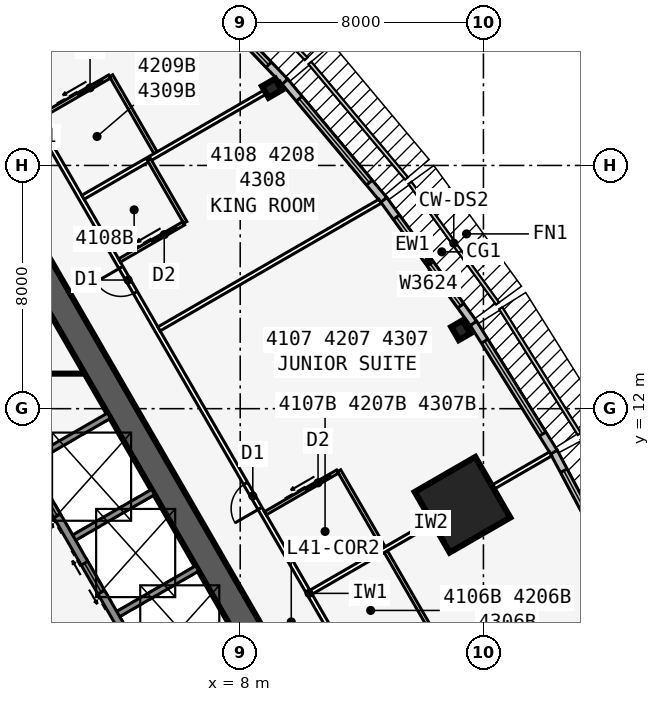
"""IFC4 building model, lengths in metres.
Left out: names, types, materials, properties, quantities, classifications, styles, units other than length and angle.
Written with IfcOpenShell. Run it as: python <this file> out.ifc"""

import sys

from ifc_helpers import new_model, si_unit, direction, frame, frame_2d, origin, origin_2d, place, context, subcontext, project, spatial, rectangle, i_section, extrude, element, fill, save


model = new_model("IFC4")
c1 = context("Model", 3, precision=1e-05, world=origin(), true_north=direction((0.0, 1.0)))
c2 = subcontext(c1, "Body", "Model", "MODEL_VIEW")
j1 = project(units=[si_unit("LENGTHUNIT", "METRE"), si_unit("PLANEANGLEUNIT", "RADIAN")], contexts=[c1])
p1 = place(None, origin())
s1 = spatial("IfcSite", under=j1, at=p1, CompositionType="ELEMENT")
p2 = place(p1, origin())
s2 = spatial("IfcBuilding", under=s1, at=p2, CompositionType="ELEMENT")
p3 = place(p2, frame((0.0, 0.0, 155.5)))
s3 = spatial("IfcBuildingStorey", under=s2, at=p3, CompositionType="ELEMENT", Elevation=155.5)
p4 = place(p3, frame((16.5, -9.526, 0.0), z_axis=(0.0, 0.0, 1.0), x_axis=(-0.499999749417, 0.866025548458, 0.0)))
e1 = element("IfcWall", 1, at=p4, inside=s3, PredefinedType="SHEAR", context=c2, shape_type="SweptSolid", body=[
    extrude(rectangle(XDim=33.0, YDim=0.9, at=frame_2d((16.5, 0.0))), origin(), (0.0, 0.0, 1.0), 3.4),
])
p5 = place(p4, frame((14.15, 0.0, 0.0)))
e2 = element("IfcOpeningElement", 2, at=p5, cuts=e1, PredefinedType="OPENING", context=c2, shape_type="SweptSolid", body=[
    extrude(rectangle(XDim=1.8, YDim=2.13, at=frame_2d((0.9, 1.065))), frame((0.0, 0.46, 0.0), z_axis=(0.0, -1.0, 0.0), x_axis=(1.0, 0.0, 0.0)), (0.0, 0.0, 1.0), 0.92),
])
p6 = place(p4, frame((12.6, 0.0, 0.0)))
e3 = element("IfcOpeningElement", 3, at=p6, cuts=e1, PredefinedType="OPENING", context=c2, shape_type="SweptSolid", body=[
    extrude(rectangle(XDim=1.0, YDim=2.13, at=frame_2d((0.5, 1.065))), frame((0.0, 0.46, 0.0), z_axis=(0.0, -1.0, 0.0), x_axis=(1.0, 0.0, 0.0)), (0.0, 0.0, 1.0), 0.92),
])
p7 = place(p3, frame((5.379, 2.586, 0.0), z_axis=(0.0, 0.0, 1.0), x_axis=(-0.500001375892, 0.866024609411, 0.0)))
e4 = element("IfcWall", 4, at=p7, inside=s3, PredefinedType="SOLIDWALL", context=c2, shape_type="SweptSolid", body=[
    extrude(rectangle(XDim=10.633, YDim=0.25, at=frame_2d((5.316, 0.0))), origin(), (0.0, 0.0, 1.0), 3.235),
])
p8 = place(p7, frame((9.164, 0.0, 0.0)))
e5 = element("IfcOpeningElement", 5, at=p8, cuts=e4, PredefinedType="OPENING", context=c2, shape_type="SweptSolid", body=[
    extrude(rectangle(XDim=0.9, YDim=2.13, at=frame_2d((0.45, 1.065))), frame((0.0, 0.135, 0.0), z_axis=(0.0, -1.0, 0.0), x_axis=(1.0, 0.0, 0.0)), (0.0, 0.0, 1.0), 0.27),
])
p9 = place(p7, frame((1.0, 0.0, 0.0)))
e6 = element("IfcOpeningElement", 6, at=p9, cuts=e4, PredefinedType="OPENING", context=c2, shape_type="SweptSolid", body=[
    extrude(rectangle(XDim=1.1, YDim=2.13, at=frame_2d((0.55, 1.065))), frame((0.0, 0.135, 0.0), z_axis=(0.0, -1.0, 0.0), x_axis=(1.0, 0.0, 0.0)), (0.0, 0.0, 1.0), 0.27),
])
p10 = place(p7, frame((3.9, 0.0, 0.0)))
e7 = element("IfcOpeningElement", 7, at=p10, cuts=e4, PredefinedType="OPENING", context=c2, shape_type="SweptSolid", body=[
    extrude(rectangle(XDim=1.1, YDim=2.13, at=frame_2d((0.55, 1.065))), frame((0.0, 0.135, 0.0), z_axis=(0.0, -1.0, 0.0), x_axis=(1.0, 0.0, 0.0)), (0.0, 0.0, 1.0), 0.27),
])
p11 = place(p7, frame((6.8, 0.0, 0.0)))
e8 = element("IfcOpeningElement", 8, at=p11, cuts=e4, PredefinedType="OPENING", context=c2, shape_type="SweptSolid", body=[
    extrude(rectangle(XDim=1.1, YDim=2.13, at=frame_2d((0.55, 1.065))), frame((0.0, 0.135, 0.0), z_axis=(0.0, -1.0, 0.0), x_axis=(1.0, 0.0, 0.0)), (0.0, 0.0, 1.0), 0.27),
])
for number, where, z_axis, x_axis in (
    (9, (3.879, 5.184, 0.0), (0.0, 0.0, 1.0), (0.866, 0.5, 0.0)),
    (10, (2.429, 7.696, 0.0), (0.0, 0.0, 1.0), (0.866, 0.5, 0.0)),
    (11, (0.979, 10.207, 0.0), (0.0, 0.0, 1.0), (0.866, 0.5, 0.0)),
):
    element("IfcWall", number, at=place(p3, frame(where, z_axis=z_axis, x_axis=x_axis)), inside=s3, PredefinedType="SOLIDWALL", context=c2, shape_type="SweptSolid", body=[
        extrude(rectangle(XDim=3.125, YDim=0.2, at=frame_2d((1.562, 0.0))), origin(), (0.0, 0.0, 1.0), 3.235),
    ])
for number, where, z_axis, x_axis in (
    (12, (15.254, 14.58, 0.0), (0.0, 0.0, 1.0), (0.866, 0.5, 0.0)),
    (13, (9.041, 22.541, 0.0), (0.0, 0.0, 1.0), (-0.5, 0.866, 0.0)),
):
    element("IfcColumn", number, at=place(p3, frame(where, z_axis=z_axis, x_axis=x_axis)), inside=s3, PredefinedType="COLUMN", context=c2, shape_type="SweptSolid", body=[
        extrude(i_section(OverallWidth=0.432, OverallDepth=0.498, WebThickness=0.056, FlangeThickness=0.089, at=origin_2d()), origin(), (0.0, 0.0, 1.0), 3.4),
    ])
p12 = place(p3, frame((15.312, 8.84, 0.0), z_axis=(0.0, 0.0, 1.0), x_axis=(0.866025403784, 0.5, 0.0)))
e14 = element("IfcColumn", 14, at=p12, inside=s3, PredefinedType="COLUMN", context=c2, shape_type="SweptSolid", body=[
    extrude(rectangle(XDim=2.3, YDim=2.3, at=origin_2d()), origin(), (0.0, 0.0, 1.0), 3.4),
])
p13 = place(p3, frame((20.663, 6.161, 0.0), z_axis=(0.0, 0.0, 1.0), x_axis=(-0.469404966864, 0.882982999317, 0.0)))
e15 = element("IfcWall", 15, at=p13, inside=s3, PredefinedType="STANDARD", context=c2, shape_type="SweptSolid", body=[
    extrude(rectangle(XDim=5.003, YDim=0.25, at=frame_2d((2.501, 0.0))), origin(), (0.0, 0.0, 1.0), 3.235),
])
p14 = place(p13, frame((0.701, 0.0, 0.45)))
e16 = element("IfcOpeningElement", 16, at=p14, cuts=e15, PredefinedType="OPENING", context=c2, shape_type="SweptSolid", body=[
    extrude(rectangle(XDim=3.6, YDim=2.4, at=frame_2d((1.8, 1.2))), frame((0.0, 0.135, 0.0), z_axis=(0.0, -1.0, 0.0), x_axis=(1.0, 0.0, 0.0)), (0.0, 0.0, 1.0), 0.27),
])
p15 = place(p3, frame((18.319, 10.571, 0.0), z_axis=(0.0, 0.0, 1.0), x_axis=(-0.529990167382, 0.84800378683, 0.0)))
e17 = element("IfcWall", 17, at=p15, inside=s3, PredefinedType="STANDARD", context=c2, shape_type="SweptSolid", body=[
    extrude(rectangle(XDim=5.003, YDim=0.25, at=frame_2d((2.501, 0.0))), origin(), (0.0, 0.0, 1.0), 3.235),
])
p16 = place(p15, frame((0.701, 0.0, 0.45)))
e18 = element("IfcOpeningElement", 18, at=p16, cuts=e17, PredefinedType="OPENING", context=c2, shape_type="SweptSolid", body=[
    extrude(rectangle(XDim=3.6, YDim=2.4, at=frame_2d((1.8, 1.2))), frame((0.0, 0.135, 0.0), z_axis=(0.0, -1.0, 0.0), x_axis=(1.0, 0.0, 0.0)), (0.0, 0.0, 1.0), 0.27),
])
p17 = place(p3, frame((15.672, 14.807, 0.0), z_axis=(0.0, 0.0, 1.0), x_axis=(-0.587669188412, 0.809101307001, 0.0)))
e19 = element("IfcWall", 19, at=p17, inside=s3, PredefinedType="STANDARD", context=c2, shape_type="SweptSolid", body=[
    extrude(rectangle(XDim=5.028, YDim=0.25, at=frame_2d((2.514, 0.0))), origin(), (0.0, 0.0, 1.0), 3.235),
])
p18 = place(p17, frame((0.714, 0.0, 0.45)))
e20 = element("IfcOpeningElement", 20, at=p18, cuts=e19, PredefinedType="OPENING", context=c2, shape_type="SweptSolid", body=[
    extrude(rectangle(XDim=3.6, YDim=2.4, at=frame_2d((1.8, 1.2))), frame((0.0, 0.135, 0.0), z_axis=(0.0, -1.0, 0.0), x_axis=(1.0, 0.0, 0.0)), (0.0, 0.0, 1.0), 0.27),
])
p19 = place(p3, frame((12.723, 18.868, 0.0), z_axis=(0.0, 0.0, 1.0), x_axis=(-0.641810386606, 0.766863369607, 0.0)))
e21 = element("IfcWall", 21, at=p19, inside=s3, PredefinedType="STANDARD", context=c2, shape_type="SweptSolid", body=[
    extrude(rectangle(XDim=5.076, YDim=0.25, at=frame_2d((2.538, 0.0))), origin(), (0.0, 0.0, 1.0), 3.235),
])
p20 = place(p19, frame((0.738, 0.0, 0.45)))
e22 = element("IfcOpeningElement", 22, at=p20, cuts=e21, PredefinedType="OPENING", context=c2, shape_type="SweptSolid", body=[
    extrude(rectangle(XDim=3.6, YDim=2.4, at=frame_2d((1.8, 1.2))), frame((0.0, 0.135, 0.0), z_axis=(0.0, -1.0, 0.0), x_axis=(1.0, 0.0, 0.0)), (0.0, 0.0, 1.0), 0.27),
])
p21 = place(p3, frame((9.471, 22.754, 0.0), z_axis=(0.0, 0.0, 1.0), x_axis=(-0.691719937936, 0.722165858693, 0.0)))
e23 = element("IfcWall", 23, at=p21, inside=s3, PredefinedType="STANDARD", context=c2, shape_type="SweptSolid", body=[
    extrude(rectangle(XDim=5.148, YDim=0.25, at=frame_2d((2.574, 0.0))), origin(), (0.0, 0.0, 1.0), 3.235),
])
p22 = place(p21, frame((0.774, 0.0, 0.45)))
e24 = element("IfcOpeningElement", 24, at=p22, cuts=e23, PredefinedType="OPENING", context=c2, shape_type="SweptSolid", body=[
    extrude(rectangle(XDim=3.6, YDim=2.4, at=frame_2d((1.8, 1.2))), frame((0.0, 0.135, 0.0), z_axis=(0.0, -1.0, 0.0), x_axis=(1.0, 0.0, 0.0)), (0.0, 0.0, 1.0), 0.27),
])
p23 = place(p3, frame((20.027, -10.985, 0.0), z_axis=(0.0, 0.0, 1.0), x_axis=(-0.500001677587, 0.866024435227, 0.0)))
e25 = element("IfcWall", 25, at=p23, inside=s3, PredefinedType="PARTITIONING", context=c2, shape_type="SweptSolid", body=[
    extrude(rectangle(XDim=39.054, YDim=0.15, at=frame_2d((19.527, 0.0))), origin(), (0.0, 0.0, 1.0), 3.235),
])
p24 = place(p23, frame((1.558, 0.0, 0.0)))
e26 = element("IfcOpeningElement", 26, at=p24, cuts=e25, PredefinedType="OPENING", context=c2, shape_type="SweptSolid", body=[
    extrude(rectangle(XDim=0.95, YDim=2.13, at=frame_2d((0.475, 1.065))), frame((0.0, 0.085, 0.0), z_axis=(0.0, -1.0, 0.0), x_axis=(1.0, 0.0, 0.0)), (0.0, 0.0, 1.0), 0.17),
])
p25 = place(p23, frame((15.352, 0.0, 0.0)))
e27 = element("IfcOpeningElement", 27, at=p25, cuts=e25, PredefinedType="OPENING", context=c2, shape_type="SweptSolid", body=[
    extrude(rectangle(XDim=0.95, YDim=2.13, at=frame_2d((0.475, 1.065))), frame((0.0, 0.085, 0.0), z_axis=(0.0, -1.0, 0.0), x_axis=(1.0, 0.0, 0.0)), (0.0, 0.0, 1.0), 0.17),
])
p26 = place(p23, frame((22.752, 0.0, 0.0)))
e28 = element("IfcOpeningElement", 28, at=p26, cuts=e25, PredefinedType="OPENING", context=c2, shape_type="SweptSolid", body=[
    extrude(rectangle(XDim=0.95, YDim=2.13, at=frame_2d((0.475, 1.065))), frame((0.0, 0.085, 0.0), z_axis=(0.0, -1.0, 0.0), x_axis=(1.0, 0.0, 0.0)), (0.0, 0.0, 1.0), 0.17),
])
p27 = place(p23, frame((30.952, 0.0, 0.0)))
e29 = element("IfcOpeningElement", 29, at=p27, cuts=e25, PredefinedType="OPENING", context=c2, shape_type="SweptSolid", body=[
    extrude(rectangle(XDim=0.95, YDim=2.13, at=frame_2d((0.475, 1.065))), frame((0.0, 0.085, 0.0), z_axis=(0.0, -1.0, 0.0), x_axis=(1.0, 0.0, 0.0)), (0.0, 0.0, 1.0), 0.17),
])
p28 = place(p23, frame((37.752, 0.0, 0.0)))
e30 = element("IfcOpeningElement", 30, at=p28, cuts=e25, PredefinedType="OPENING", context=c2, shape_type="SweptSolid", body=[
    extrude(rectangle(XDim=0.95, YDim=2.13, at=frame_2d((0.475, 1.065))), frame((0.0, 0.085, 0.0), z_axis=(0.0, -1.0, 0.0), x_axis=(1.0, 0.0, 0.0)), (0.0, 0.0, 1.0), 0.17),
])
p29 = place(p3, frame((10.329, 5.963, 0.0), z_axis=(0.0, 0.0, 1.0), x_axis=(0.866025170687, 0.500000403736, 0.0)))
e31 = element("IfcWall", 31, at=p29, inside=s3, PredefinedType="PARTITIONING", context=c2, shape_type="SweptSolid", body=[
    extrude(rectangle(XDim=9.099, YDim=0.15, at=frame_2d((4.549, 0.0))), origin(), (0.0, 0.0, 1.0), 2.389),
])
p30 = place(p3, frame((5.329, 14.623, 0.0), z_axis=(0.0, 0.0, 1.0), x_axis=(0.866011723728, 0.500023693804, 0.0)))
e32 = element("IfcWall", 32, at=p30, inside=s3, PredefinedType="PARTITIONING", context=c2, shape_type="SweptSolid", body=[
    extrude(rectangle(XDim=8.395, YDim=0.15, at=frame_2d((4.198, 0.0))), origin(), (0.0, 0.0, 1.0), 2.389),
])
p31 = place(p3, frame((2.829, 18.954, 0.0), z_axis=(0.0, 0.0, 1.0), x_axis=(0.866015739374, 0.500016738876, 0.0)))
e33 = element("IfcWall", 33, at=p31, inside=s3, PredefinedType="PARTITIONING", context=c2, shape_type="SweptSolid", body=[
    extrude(rectangle(XDim=7.516, YDim=0.15, at=frame_2d((3.758, 0.0))), origin(), (0.0, 0.0, 1.0), 2.389),
])
p32 = place(p3, frame((14.253, 4.765, 0.0), z_axis=(0.0, 0.0, 1.0), x_axis=(-0.50002537861, 0.866010750942, 0.0)))
e34 = element("IfcWall", 34, at=p32, inside=s3, PredefinedType="PLUMBINGWALL", context=c2, shape_type="SweptSolid", body=[
    extrude(rectangle(XDim=3.0, YDim=0.12, at=frame_2d((1.5, 0.0))), origin(), (0.0, 0.0, 1.0), 3.235),
])
p33 = place(p3, frame((12.753, 7.363, 0.0), z_axis=(0.0, 0.0, 1.0), x_axis=(-0.499990139034, 0.866031096941, 0.0)))
e35 = element("IfcWall", 35, at=p33, inside=s3, PredefinedType="PLUMBINGWALL", context=c2, shape_type="SweptSolid", body=[
    extrude(rectangle(XDim=3.0, YDim=0.12, at=frame_2d((1.5, 0.0))), origin(), (0.0, 0.0, 1.0), 3.235),
])
p34 = place(p3, frame((8.829, 8.561, 0.0), z_axis=(0.0, 0.0, 1.0), x_axis=(0.866035715982, 0.499982138324, 0.0)))
e36 = element("IfcWall", 36, at=p34, inside=s3, PredefinedType="PLUMBINGWALL", context=c2, shape_type="SweptSolid", body=[
    extrude(rectangle(XDim=2.74, YDim=0.12, at=frame_2d((1.37, 0.0))), origin(), (0.0, 0.0, 1.0), 3.235),
])
p35 = place(p34, frame((1.55, 0.0, 0.0)))
e37 = element("IfcOpeningElement", 37, at=p35, cuts=e36, PredefinedType="OPENING", context=c2, shape_type="SweptSolid", body=[
    extrude(rectangle(XDim=0.9, YDim=2.13, at=frame_2d((0.45, 1.065))), frame((0.0, 0.07, 0.0), z_axis=(0.0, -1.0, 0.0), x_axis=(1.0, 0.0, 0.0)), (0.0, 0.0, 1.0), 0.14),
])
p36 = place(p3, frame((6.194, 18.125, 0.0), z_axis=(0.0, 0.0, 1.0), x_axis=(-0.500033551112, 0.866006032174, 0.0)))
e38 = element("IfcWall", 38, at=p36, inside=s3, PredefinedType="PLUMBINGWALL", context=c2, shape_type="SweptSolid", body=[
    extrude(rectangle(XDim=2.4, YDim=0.12, at=frame_2d((1.2, 0.0))), origin(), (0.0, 0.0, 1.0), 3.235),
])
p37 = place(p3, frame((4.029, 16.875, 0.0), z_axis=(0.0, 0.0, 1.0), x_axis=(0.865980627057, 0.500077547548, 0.0)))
e39 = element("IfcWall", 39, at=p37, inside=s3, PredefinedType="PLUMBINGWALL", context=c2, shape_type="SweptSolid", body=[
    extrude(rectangle(XDim=2.44, YDim=0.12, at=frame_2d((1.22, 0.0))), origin(), (0.0, 0.0, 1.0), 3.235),
])
p38 = place(p37, frame((1.25, 0.0, 0.0)))
e40 = element("IfcOpeningElement", 40, at=p38, cuts=e39, PredefinedType="OPENING", context=c2, shape_type="SweptSolid", body=[
    extrude(rectangle(XDim=0.9, YDim=2.13, at=frame_2d((0.45, 1.065))), frame((0.0, 0.07, 0.0), z_axis=(0.0, -1.0, 0.0), x_axis=(1.0, 0.0, 0.0)), (0.0, 0.0, 1.0), 0.14),
])
p39 = place(p3, frame((5.253, 20.354, 0.0), z_axis=(0.0, 0.0, 1.0), x_axis=(-0.499990139034, 0.866031096941, 0.0)))
e41 = element("IfcWall", 41, at=p39, inside=s3, PredefinedType="PLUMBINGWALL", context=c2, shape_type="SweptSolid", body=[
    extrude(rectangle(XDim=3.0, YDim=0.12, at=frame_2d((1.5, 0.0))), origin(), (0.0, 0.0, 1.0), 3.235),
])
p40 = place(p3, frame((1.329, 21.552, 0.0), z_axis=(0.0, 0.0, 1.0), x_axis=(0.865997131366, 0.500048966069, 0.0)))
e42 = element("IfcWall", 42, at=p40, inside=s3, PredefinedType="PLUMBINGWALL", context=c2, shape_type="SweptSolid", body=[
    extrude(rectangle(XDim=2.74, YDim=0.12, at=frame_2d((1.37, 0.0))), origin(), (0.0, 0.0, 1.0), 3.235),
])
p41 = place(p40, frame((1.55, 0.0, 0.0)))
e43 = element("IfcOpeningElement", 43, at=p41, cuts=e42, PredefinedType="OPENING", context=c2, shape_type="SweptSolid", body=[
    extrude(rectangle(XDim=0.9, YDim=2.13, at=frame_2d((0.45, 1.065))), frame((0.0, 0.07, 0.0), z_axis=(0.0, -1.0, 0.0), x_axis=(1.0, 0.0, 0.0)), (0.0, 0.0, 1.0), 0.14),
])
p42 = place(p3, frame((-2.887, 13.153, 0.0), z_axis=(0.0, 0.0, 1.0), x_axis=(1.0, 0.0, 0.0)))
e44 = element("IfcWall", 44, at=p42, inside=s3, PredefinedType="PARTITIONING", context=c2, shape_type="SweptSolid", body=[
    extrude(rectangle(XDim=5.773, YDim=0.1, at=frame_2d((2.887, 0.0))), origin(), (0.0, 0.0, 1.0), 3.235),
])
p43 = place(p42, frame((2.437, 0.0, 0.0)))
e45 = element("IfcOpeningElement", 45, at=p43, cuts=e44, PredefinedType="OPENING", context=c2, shape_type="SweptSolid", body=[
    extrude(rectangle(XDim=0.9, YDim=2.13, at=frame_2d((0.45, 1.065))), frame((0.0, 0.06, 0.0), z_axis=(0.0, -1.0, 0.0), x_axis=(1.0, 0.0, 0.0)), (0.0, 0.0, 1.0), 0.12),
])
p44 = place(p14, origin())
e46 = element("IfcWindow", 46, at=p44, inside=s3, PartitioningType="SINGLE_PANEL", PredefinedType="WINDOW", context=c2, shape_type="SweptSolid", body=[
    extrude(rectangle(XDim=3.6, YDim=2.4, at=frame_2d((1.8, 1.2))), frame((0.0, 0.03, 0.0), z_axis=(0.0, -1.0, 0.0), x_axis=(1.0, 0.0, 0.0)), (0.0, 0.0, 1.0), 0.06),
])
fill(e16, e46)
p45 = place(p16, origin())
e47 = element("IfcWindow", 47, at=p45, inside=s3, PartitioningType="SINGLE_PANEL", PredefinedType="WINDOW", context=c2, shape_type="SweptSolid", body=[
    extrude(rectangle(XDim=3.6, YDim=2.4, at=frame_2d((1.8, 1.2))), frame((0.0, 0.03, 0.0), z_axis=(0.0, -1.0, 0.0), x_axis=(1.0, 0.0, 0.0)), (0.0, 0.0, 1.0), 0.06),
])
fill(e18, e47)
p46 = place(p18, origin())
e48 = element("IfcWindow", 48, at=p46, inside=s3, PartitioningType="SINGLE_PANEL", PredefinedType="WINDOW", context=c2, shape_type="SweptSolid", body=[
    extrude(rectangle(XDim=3.6, YDim=2.4, at=frame_2d((1.8, 1.2))), frame((0.0, 0.03, 0.0), z_axis=(0.0, -1.0, 0.0), x_axis=(1.0, 0.0, 0.0)), (0.0, 0.0, 1.0), 0.06),
])
fill(e20, e48)
p47 = place(p20, origin())
e49 = element("IfcWindow", 49, at=p47, inside=s3, PartitioningType="SINGLE_PANEL", PredefinedType="WINDOW", context=c2, shape_type="SweptSolid", body=[
    extrude(rectangle(XDim=3.6, YDim=2.4, at=frame_2d((1.8, 1.2))), frame((0.0, 0.03, 0.0), z_axis=(0.0, -1.0, 0.0), x_axis=(1.0, 0.0, 0.0)), (0.0, 0.0, 1.0), 0.06),
])
fill(e22, e49)
p48 = place(p22, origin())
e50 = element("IfcWindow", 50, at=p48, inside=s3, PartitioningType="SINGLE_PANEL", PredefinedType="WINDOW", context=c2, shape_type="SweptSolid", body=[
    extrude(rectangle(XDim=3.6, YDim=2.4, at=frame_2d((1.8, 1.2))), frame((0.0, 0.03, 0.0), z_axis=(0.0, -1.0, 0.0), x_axis=(1.0, 0.0, 0.0)), (0.0, 0.0, 1.0), 0.06),
])
fill(e24, e50)
p49 = place(p35, origin())
e51 = element("IfcDoor", 51, at=p49, inside=s3, OperationType="SLIDING_TO_LEFT", PredefinedType="DOOR", context=c2, shape_type="SweptSolid", body=[
    extrude(rectangle(XDim=0.9, YDim=2.13, at=frame_2d((0.45, 1.065))), frame((0.0, 0.025, 0.0), z_axis=(0.0, -1.0, 0.0), x_axis=(1.0, 0.0, 0.0)), (0.0, 0.0, 1.0), 0.05),
])
fill(e37, e51)
p50 = place(p26, origin())
e52 = element("IfcDoor", 52, at=p50, inside=s3, OperationType="SINGLE_SWING_LEFT", PredefinedType="DOOR", context=c2, shape_type="SweptSolid", body=[
    extrude(rectangle(XDim=0.95, YDim=2.13, at=frame_2d((0.475, 1.065))), frame((0.0, 0.025, 0.0), z_axis=(0.0, -1.0, 0.0), x_axis=(1.0, 0.0, 0.0)), (0.0, 0.0, 1.0), 0.05),
])
fill(e28, e52)
p51 = place(p38, origin())
e53 = element("IfcDoor", 53, at=p51, inside=s3, OperationType="SLIDING_TO_LEFT", PredefinedType="DOOR", context=c2, shape_type="SweptSolid", body=[
    extrude(rectangle(XDim=0.9, YDim=2.13, at=frame_2d((0.45, 1.065))), frame((0.0, 0.025, 0.0), z_axis=(0.0, -1.0, 0.0), x_axis=(1.0, 0.0, 0.0)), (0.0, 0.0, 1.0), 0.05),
])
fill(e40, e53)
p52 = place(p27, origin())
e54 = element("IfcDoor", 54, at=p52, inside=s3, OperationType="SINGLE_SWING_RIGHT", PredefinedType="DOOR", context=c2, shape_type="SweptSolid", body=[
    extrude(rectangle(XDim=0.95, YDim=2.13, at=frame_2d((0.475, 1.065))), frame((0.0, 0.025, 0.0), z_axis=(0.0, -1.0, 0.0), x_axis=(1.0, 0.0, 0.0)), (0.0, 0.0, 1.0), 0.05),
])
fill(e29, e54)
p53 = place(p41, origin())
e55 = element("IfcDoor", 55, at=p53, inside=s3, OperationType="SLIDING_TO_LEFT", PredefinedType="DOOR", context=c2, shape_type="SweptSolid", body=[
    extrude(rectangle(XDim=0.9, YDim=2.13, at=frame_2d((0.45, 1.065))), frame((0.0, 0.025, 0.0), z_axis=(0.0, -1.0, 0.0), x_axis=(1.0, 0.0, 0.0)), (0.0, 0.0, 1.0), 0.05),
])
fill(e43, e55)
p54 = place(p10, origin())
e56 = element("IfcDoor", 56, at=p54, inside=s3, OperationType="DOUBLE_DOOR_SLIDING", PredefinedType="USERDEFINED", context=c2, shape_type="SweptSolid", body=[
    extrude(rectangle(XDim=1.1, YDim=2.13, at=frame_2d((0.55, 1.065))), frame((0.0, 0.025, 0.0), z_axis=(0.0, -1.0, 0.0), x_axis=(1.0, 0.0, 0.0)), (0.0, 0.0, 1.0), 0.05),
])
fill(e7, e56)
p55 = place(p11, origin())
e57 = element("IfcDoor", 57, at=p55, inside=s3, OperationType="DOUBLE_DOOR_SLIDING", PredefinedType="USERDEFINED", context=c2, shape_type="SweptSolid", body=[
    extrude(rectangle(XDim=1.1, YDim=2.13, at=frame_2d((0.55, 1.065))), frame((0.0, 0.025, 0.0), z_axis=(0.0, -1.0, 0.0), x_axis=(1.0, 0.0, 0.0)), (0.0, 0.0, 1.0), 0.05),
])
fill(e8, e57)
save(model, sys.argv[1])
